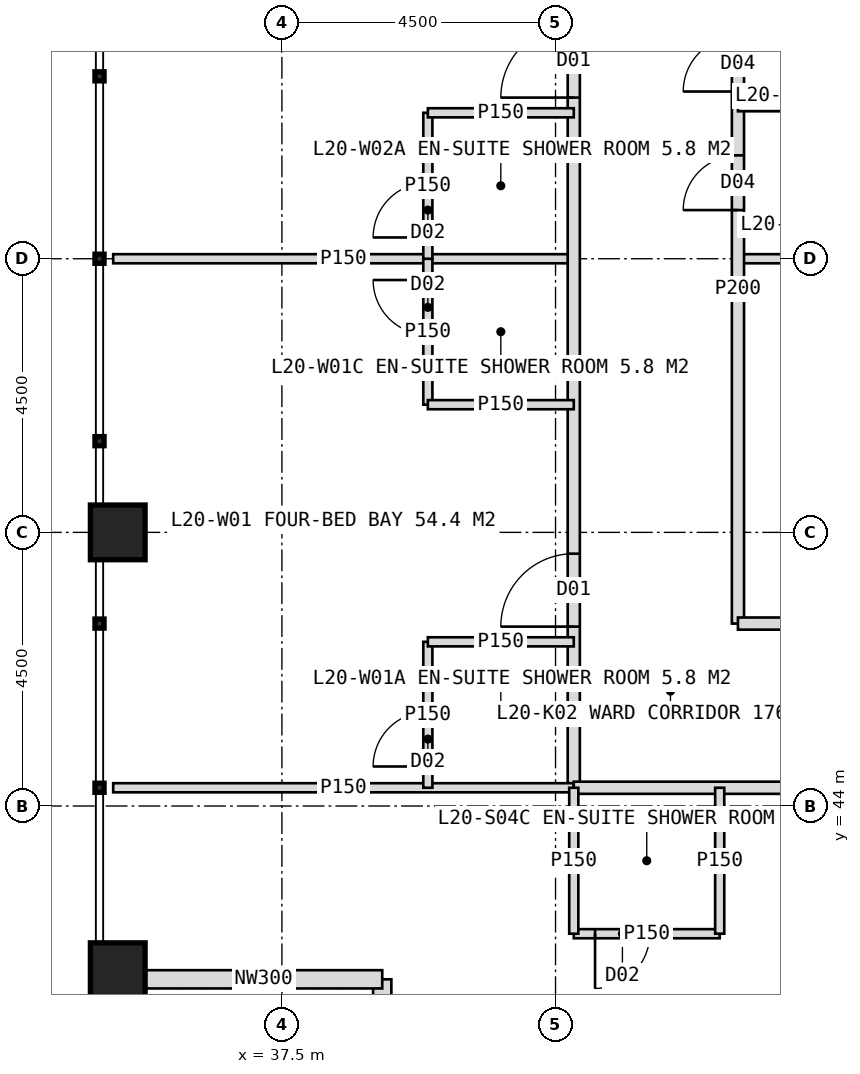
"""IFC4 building model, lengths in metres.
Left out: names, types, materials, properties, quantities, classifications, styles, units other than length and angle.
Written with IfcOpenShell. Run it as: python <this file> out.ifc"""

import sys

from ifc_helpers import new_model, si_unit, direction, frame, frame_2d, origin, origin_2d, place, context, subcontext, project, spatial, rectangle, hollow_rectangle, extrude, element, fill, save


model = new_model("IFC4")
c1 = context("Model", 3, precision=1e-05, world=origin(), true_north=direction((0.0, 1.0)))
c2 = subcontext(c1, "Body", "Model", "MODEL_VIEW")
j1 = project(units=[si_unit("LENGTHUNIT", "METRE"), si_unit("PLANEANGLEUNIT", "RADIAN")], contexts=[c1])
p1 = place(None, origin())
s1 = spatial("IfcSite", under=j1, at=p1, CompositionType="ELEMENT")
p2 = place(p1, origin())
s2 = spatial("IfcBuilding", under=s1, at=p2, CompositionType="ELEMENT")
p3 = place(p2, frame((0.0, 0.0, 87.0)))
s3 = spatial("IfcBuildingStorey", under=s2, at=p3, CompositionType="ELEMENT", Elevation=87.0)
for number, where, z_axis, x_axis in (
    (1, (34.8, 41.3, 0.0), (0.0, 0.0, 1.0), (1.0, 0.0, 0.0)),
    (2, (34.8, 48.5, 0.0), (0.0, 0.0, 1.0), (1.0, 0.0, 0.0)),
):
    element("IfcColumn", number, at=place(p3, frame(where, z_axis=z_axis, x_axis=x_axis)), inside=s3, PredefinedType="COLUMN", context=c2, shape_type="SweptSolid", body=[
        extrude(hollow_rectangle(XDim=0.9, YDim=0.9, WallThickness=0.08, at=origin_2d()), origin(), (0.0, 0.0, 1.0), 4.0),
    ])
for number, where, z_axis, x_axis in (
    (3, (39.15, 37.25, 0.0), (0.0, 0.0, 1.0), (0.0, 1.0, 0.0)),
    (4, (39.15, 41.15, 0.0), (0.0, 0.0, 1.0), (-1.0, 0.0, 0.0)),
):
    element("IfcWall", number, at=place(p3, frame(where, z_axis=z_axis, x_axis=x_axis)), inside=s3, PredefinedType="ELEMENTEDWALL", context=c2, shape_type="SweptSolid", body=[
        extrude(rectangle(XDim=3.9, YDim=0.3, at=frame_2d((1.95, 0.0))), origin(), (0.0, 0.0, 1.0), 2.95),
    ])
p4 = place(p3, frame((42.3, 53.0, 0.0), z_axis=(0.0, 0.0, 1.0), x_axis=(-1.0, 0.0, 0.0)))
e5 = element("IfcWall", 5, at=p4, inside=s3, PredefinedType="PARTITIONING", context=c2, shape_type="SweptSolid", body=[
    extrude(rectangle(XDim=7.575, YDim=0.15, at=frame_2d((3.788, 0.0))), origin(), (0.0, 0.0, 1.0), 3.75),
])
p5 = place(p3, frame((42.3, 44.3, 0.0), z_axis=(0.0, 0.0, 1.0), x_axis=(0.0, 1.0, 0.0)))
e6 = element("IfcWall", 6, at=p5, inside=s3, PredefinedType="PARTITIONING", context=c2, shape_type="SweptSolid", body=[
    extrude(rectangle(XDim=35.4, YDim=0.2, at=frame_2d((17.7, 0.0))), origin(), (0.0, 0.0, 1.0), 3.75),
])
p6 = place(p5, frame((2.65, 0.0, 0.0)))
e7 = element("IfcOpeningElement", 7, at=p6, cuts=e6, PredefinedType="OPENING", context=c2, shape_type="SweptSolid", body=[
    extrude(rectangle(XDim=1.2, YDim=2.2, at=frame_2d((0.6, 1.1))), frame((0.0, 0.11, 0.0), z_axis=(0.0, -1.0, 0.0), x_axis=(1.0, 0.0, 0.0)), (0.0, 0.0, 1.0), 0.22),
])
p7 = place(p5, frame((11.35, 0.0, 0.0)))
e8 = element("IfcOpeningElement", 8, at=p7, cuts=e6, PredefinedType="OPENING", context=c2, shape_type="SweptSolid", body=[
    extrude(rectangle(XDim=1.2, YDim=2.2, at=frame_2d((0.6, 1.1))), frame((0.0, 0.11, 0.0), z_axis=(0.0, -1.0, 0.0), x_axis=(1.0, 0.0, 0.0)), (0.0, 0.0, 1.0), 0.22),
])
p8 = place(p5, frame((20.35, 0.0, 0.0)))
e9 = element("IfcOpeningElement", 9, at=p8, cuts=e6, PredefinedType="OPENING", context=c2, shape_type="SweptSolid", body=[
    extrude(rectangle(XDim=1.2, YDim=2.2, at=frame_2d((0.6, 1.1))), frame((0.0, 0.11, 0.0), z_axis=(0.0, -1.0, 0.0), x_axis=(1.0, 0.0, 0.0)), (0.0, 0.0, 1.0), 0.22),
])
p9 = place(p5, frame((26.35, 0.0, 0.0)))
e10 = element("IfcOpeningElement", 10, at=p9, cuts=e6, PredefinedType="OPENING", context=c2, shape_type="SweptSolid", body=[
    extrude(rectangle(XDim=1.2, YDim=2.2, at=frame_2d((0.6, 1.1))), frame((0.0, 0.11, 0.0), z_axis=(0.0, -1.0, 0.0), x_axis=(1.0, 0.0, 0.0)), (0.0, 0.0, 1.0), 0.22),
])
p10 = place(p5, frame((30.85, 0.0, 0.0)))
e11 = element("IfcOpeningElement", 11, at=p10, cuts=e6, PredefinedType="OPENING", context=c2, shape_type="SweptSolid", body=[
    extrude(rectangle(XDim=1.2, YDim=2.2, at=frame_2d((0.6, 1.1))), frame((0.0, 0.11, 0.0), z_axis=(0.0, -1.0, 0.0), x_axis=(1.0, 0.0, 0.0)), (0.0, 0.0, 1.0), 0.22),
])
p11 = place(p3, frame((42.3, 44.3, 0.0), z_axis=(0.0, 0.0, 1.0), x_axis=(-1.0, 0.0, 0.0)))
e12 = element("IfcWall", 12, at=p11, inside=s3, PredefinedType="PARTITIONING", context=c2, shape_type="SweptSolid", body=[
    extrude(rectangle(XDim=7.575, YDim=0.15, at=frame_2d((3.788, 0.0))), origin(), (0.0, 0.0, 1.0), 3.75),
])
p12 = place(p3, frame((39.9, 44.3, 0.0), z_axis=(0.0, 0.0, 1.0), x_axis=(0.0, 1.0, 0.0)))
e13 = element("IfcWall", 13, at=p12, inside=s3, PredefinedType="PARTITIONING", context=c2, shape_type="SweptSolid", body=[
    extrude(rectangle(XDim=2.4, YDim=0.15, at=frame_2d((1.2, 0.0))), origin(), (0.0, 0.0, 1.0), 3.75),
])
p13 = place(p12, frame((0.35, 0.0, 0.0)))
e14 = element("IfcOpeningElement", 14, at=p13, cuts=e13, PredefinedType="OPENING", context=c2, shape_type="SweptSolid", body=[
    extrude(rectangle(XDim=0.9, YDim=2.1, at=frame_2d((0.45, 1.05))), frame((0.0, 0.085, 0.0), z_axis=(0.0, -1.0, 0.0), x_axis=(1.0, 0.0, 0.0)), (0.0, 0.0, 1.0), 0.17),
])
p14 = place(p3, frame((42.3, 46.7, 0.0), z_axis=(0.0, 0.0, 1.0), x_axis=(-1.0, 0.0, 0.0)))
e15 = element("IfcWall", 15, at=p14, inside=s3, PredefinedType="PARTITIONING", context=c2, shape_type="SweptSolid", body=[
    extrude(rectangle(XDim=2.4, YDim=0.15, at=frame_2d((1.2, 0.0))), origin(), (0.0, 0.0, 1.0), 3.75),
])
p15 = place(p3, frame((39.9, 50.6, 0.0), z_axis=(0.0, 0.0, 1.0), x_axis=(0.0, 1.0, 0.0)))
e16 = element("IfcWall", 16, at=p15, inside=s3, PredefinedType="PARTITIONING", context=c2, shape_type="SweptSolid", body=[
    extrude(rectangle(XDim=2.4, YDim=0.15, at=frame_2d((1.2, 0.0))), origin(), (0.0, 0.0, 1.0), 3.75),
])
p16 = place(p15, frame((1.15, 0.0, 0.0)))
e17 = element("IfcOpeningElement", 17, at=p16, cuts=e16, PredefinedType="OPENING", context=c2, shape_type="SweptSolid", body=[
    extrude(rectangle(XDim=0.9, YDim=2.1, at=frame_2d((0.45, 1.05))), frame((0.0, 0.085, 0.0), z_axis=(0.0, -1.0, 0.0), x_axis=(1.0, 0.0, 0.0)), (0.0, 0.0, 1.0), 0.17),
])
p17 = place(p3, frame((42.3, 50.6, 0.0), z_axis=(0.0, 0.0, 1.0), x_axis=(-1.0, 0.0, 0.0)))
e18 = element("IfcWall", 18, at=p17, inside=s3, PredefinedType="PARTITIONING", context=c2, shape_type="SweptSolid", body=[
    extrude(rectangle(XDim=2.4, YDim=0.15, at=frame_2d((1.2, 0.0))), origin(), (0.0, 0.0, 1.0), 3.75),
])
p18 = place(p3, frame((39.9, 53.0, 0.0), z_axis=(0.0, 0.0, 1.0), x_axis=(0.0, 1.0, 0.0)))
e19 = element("IfcWall", 19, at=p18, inside=s3, PredefinedType="PARTITIONING", context=c2, shape_type="SweptSolid", body=[
    extrude(rectangle(XDim=2.4, YDim=0.15, at=frame_2d((1.2, 0.0))), origin(), (0.0, 0.0, 1.0), 3.75),
])
p19 = place(p18, frame((0.35, 0.0, 0.0)))
e20 = element("IfcOpeningElement", 20, at=p19, cuts=e19, PredefinedType="OPENING", context=c2, shape_type="SweptSolid", body=[
    extrude(rectangle(XDim=0.9, YDim=2.1, at=frame_2d((0.45, 1.05))), frame((0.0, 0.085, 0.0), z_axis=(0.0, -1.0, 0.0), x_axis=(1.0, 0.0, 0.0)), (0.0, 0.0, 1.0), 0.17),
])
p20 = place(p3, frame((42.3, 55.4, 0.0), z_axis=(0.0, 0.0, 1.0), x_axis=(-1.0, 0.0, 0.0)))
e21 = element("IfcWall", 21, at=p20, inside=s3, PredefinedType="PARTITIONING", context=c2, shape_type="SweptSolid", body=[
    extrude(rectangle(XDim=2.4, YDim=0.15, at=frame_2d((1.2, 0.0))), origin(), (0.0, 0.0, 1.0), 3.75),
])
p21 = place(p3, frame((51.0, 53.0, 0.0), z_axis=(0.0, 0.0, 1.0), x_axis=(-1.0, 0.0, 0.0)))
e22 = element("IfcWall", 22, at=p21, inside=s3, PredefinedType="PARTITIONING", context=c2, shape_type="SweptSolid", body=[
    extrude(rectangle(XDim=6.0, YDim=0.15, at=frame_2d((3.0, 0.0))), origin(), (0.0, 0.0, 1.0), 3.75),
])
p22 = place(p3, frame((45.0, 47.0, 0.0), z_axis=(0.0, 0.0, 1.0), x_axis=(0.0, 1.0, 0.0)))
e23 = element("IfcWall", 23, at=p22, inside=s3, PredefinedType="PARTITIONING", context=c2, shape_type="SweptSolid", body=[
    extrude(rectangle(XDim=11.0, YDim=0.2, at=frame_2d((5.5, 0.0))), origin(), (0.0, 0.0, 1.0), 3.75),
])
p23 = place(p22, frame((6.8, 0.0, 0.0)))
e24 = element("IfcOpeningElement", 24, at=p23, cuts=e23, PredefinedType="OPENING", context=c2, shape_type="SweptSolid", body=[
    extrude(rectangle(XDim=0.9, YDim=2.1, at=frame_2d((0.45, 1.05))), frame((0.0, 0.11, 0.0), z_axis=(0.0, -1.0, 0.0), x_axis=(1.0, 0.0, 0.0)), (0.0, 0.0, 1.0), 0.22),
])
p24 = place(p22, frame((8.75, 0.0, 0.0)))
e25 = element("IfcOpeningElement", 25, at=p24, cuts=e23, PredefinedType="OPENING", context=c2, shape_type="SweptSolid", body=[
    extrude(rectangle(XDim=0.9, YDim=2.1, at=frame_2d((0.45, 1.05))), frame((0.0, 0.11, 0.0), z_axis=(0.0, -1.0, 0.0), x_axis=(1.0, 0.0, 0.0)), (0.0, 0.0, 1.0), 0.22),
])
p25 = place(p3, frame((51.0, 55.5, 0.0), z_axis=(0.0, 0.0, 1.0), x_axis=(-1.0, 0.0, 0.0)))
e26 = element("IfcWall", 26, at=p25, inside=s3, PredefinedType="PARTITIONING", context=c2, shape_type="SweptSolid", body=[
    extrude(rectangle(XDim=6.0, YDim=0.15, at=frame_2d((3.0, 0.0))), origin(), (0.0, 0.0, 1.0), 3.75),
])
p26 = place(p3, frame((77.7, 44.3, 0.0), z_axis=(0.0, 0.0, 1.0), x_axis=(-1.0, 0.0, 0.0)))
e27 = element("IfcWall", 27, at=p26, inside=s3, PredefinedType="PARTITIONING", context=c2, shape_type="SweptSolid", body=[
    extrude(rectangle(XDim=35.4, YDim=0.2, at=frame_2d((17.7, 0.0))), origin(), (0.0, 0.0, 1.0), 3.75),
])
p27 = place(p26, frame((2.65, 0.0, 0.0)))
e28 = element("IfcOpeningElement", 28, at=p27, cuts=e27, PredefinedType="OPENING", context=c2, shape_type="SweptSolid", body=[
    extrude(rectangle(XDim=1.2, YDim=2.2, at=frame_2d((0.6, 1.1))), frame((0.0, 0.11, 0.0), z_axis=(0.0, -1.0, 0.0), x_axis=(1.0, 0.0, 0.0)), (0.0, 0.0, 1.0), 0.22),
])
p28 = place(p26, frame((11.35, 0.0, 0.0)))
e29 = element("IfcOpeningElement", 29, at=p28, cuts=e27, PredefinedType="OPENING", context=c2, shape_type="SweptSolid", body=[
    extrude(rectangle(XDim=1.2, YDim=2.2, at=frame_2d((0.6, 1.1))), frame((0.0, 0.11, 0.0), z_axis=(0.0, -1.0, 0.0), x_axis=(1.0, 0.0, 0.0)), (0.0, 0.0, 1.0), 0.22),
])
p29 = place(p26, frame((20.35, 0.0, 0.0)))
e30 = element("IfcOpeningElement", 30, at=p29, cuts=e27, PredefinedType="OPENING", context=c2, shape_type="SweptSolid", body=[
    extrude(rectangle(XDim=1.2, YDim=2.2, at=frame_2d((0.6, 1.1))), frame((0.0, 0.11, 0.0), z_axis=(0.0, -1.0, 0.0), x_axis=(1.0, 0.0, 0.0)), (0.0, 0.0, 1.0), 0.22),
])
p30 = place(p26, frame((29.35, 0.0, 0.0)))
e31 = element("IfcOpeningElement", 31, at=p30, cuts=e27, PredefinedType="OPENING", context=c2, shape_type="SweptSolid", body=[
    extrude(rectangle(XDim=1.2, YDim=2.2, at=frame_2d((0.6, 1.1))), frame((0.0, 0.11, 0.0), z_axis=(0.0, -1.0, 0.0), x_axis=(1.0, 0.0, 0.0)), (0.0, 0.0, 1.0), 0.22),
])
p31 = place(p3, frame((44.7, 41.9, 0.0), z_axis=(0.0, 0.0, 1.0), x_axis=(-1.0, 0.0, 0.0)))
e32 = element("IfcWall", 32, at=p31, inside=s3, PredefinedType="PARTITIONING", context=c2, shape_type="SweptSolid", body=[
    extrude(rectangle(XDim=2.4, YDim=0.15, at=frame_2d((1.2, 0.0))), origin(), (0.0, 0.0, 1.0), 3.75),
])
p32 = place(p31, frame((1.15, 0.0, 0.0)))
e33 = element("IfcOpeningElement", 33, at=p32, cuts=e32, PredefinedType="OPENING", context=c2, shape_type="SweptSolid", body=[
    extrude(rectangle(XDim=0.9, YDim=2.1, at=frame_2d((0.45, 1.05))), frame((0.0, 0.085, 0.0), z_axis=(0.0, -1.0, 0.0), x_axis=(1.0, 0.0, 0.0)), (0.0, 0.0, 1.0), 0.17),
])
for number, where, z_axis, x_axis in (
    (34, (44.7, 44.3, 0.0), (0.0, 0.0, 1.0), (0.0, -1.0, 0.0)),
    (35, (42.3, 44.3, 0.0), (0.0, 0.0, 1.0), (0.0, -1.0, 0.0)),
):
    element("IfcWall", number, at=place(p3, frame(where, z_axis=z_axis, x_axis=x_axis)), inside=s3, PredefinedType="PARTITIONING", context=c2, shape_type="SweptSolid", body=[
        extrude(rectangle(XDim=2.4, YDim=0.15, at=frame_2d((1.2, 0.0))), origin(), (0.0, 0.0, 1.0), 3.75),
    ])
p33 = place(p3, frame((57.75, 47.0, 0.0), z_axis=(0.0, 0.0, 1.0), x_axis=(-1.0, 0.0, 0.0)))
e36 = element("IfcWall", 36, at=p33, inside=s3, PredefinedType="PARTITIONING", context=c2, shape_type="SweptSolid", body=[
    extrude(rectangle(XDim=12.75, YDim=0.2, at=frame_2d((6.375, 0.0))), origin(), (0.0, 0.0, 1.0), 3.75),
])
p34 = place(p33, frame((3.55, 0.0, 0.0)))
e37 = element("IfcOpeningElement", 37, at=p34, cuts=e36, PredefinedType="OPENING", context=c2, shape_type="SweptSolid", body=[
    extrude(rectangle(XDim=1.0, YDim=2.1, at=frame_2d((0.5, 1.05))), frame((0.0, 0.11, 0.0), z_axis=(0.0, -1.0, 0.0), x_axis=(1.0, 0.0, 0.0)), (0.0, 0.0, 1.0), 0.22),
])
p35 = place(p33, frame((8.5, 0.0, 0.0)))
e38 = element("IfcOpeningElement", 38, at=p35, cuts=e36, PredefinedType="OPENING", context=c2, shape_type="SweptSolid", body=[
    extrude(rectangle(XDim=1.0, YDim=2.1, at=frame_2d((0.5, 1.05))), frame((0.0, 0.11, 0.0), z_axis=(0.0, -1.0, 0.0), x_axis=(1.0, 0.0, 0.0)), (0.0, 0.0, 1.0), 0.22),
])
p36 = place(p6, origin())
e39 = element("IfcDoor", 39, at=p36, inside=s3, OperationType="SINGLE_SWING_LEFT", PredefinedType="DOOR", context=c2, shape_type="SweptSolid", body=[
    extrude(rectangle(XDim=1.2, YDim=2.2, at=frame_2d((0.6, 1.1))), frame((0.0, 0.025, 0.0), z_axis=(0.0, -1.0, 0.0), x_axis=(1.0, 0.0, 0.0)), (0.0, 0.0, 1.0), 0.05),
])
fill(e7, e39)
p37 = place(p13, origin())
e40 = element("IfcDoor", 40, at=p37, inside=s3, OperationType="SINGLE_SWING_LEFT", PredefinedType="DOOR", context=c2, shape_type="SweptSolid", body=[
    extrude(rectangle(XDim=0.9, YDim=2.1, at=frame_2d((0.45, 1.05))), frame((0.0, 0.025, 0.0), z_axis=(0.0, -1.0, 0.0), x_axis=(1.0, 0.0, 0.0)), (0.0, 0.0, 1.0), 0.05),
])
fill(e14, e40)
p38 = place(p16, origin())
e41 = element("IfcDoor", 41, at=p38, inside=s3, OperationType="SINGLE_SWING_RIGHT", PredefinedType="DOOR", context=c2, shape_type="SweptSolid", body=[
    extrude(rectangle(XDim=0.9, YDim=2.1, at=frame_2d((0.45, 1.05))), frame((0.0, 0.025, 0.0), z_axis=(0.0, -1.0, 0.0), x_axis=(1.0, 0.0, 0.0)), (0.0, 0.0, 1.0), 0.05),
])
fill(e17, e41)
p39 = place(p7, origin())
e42 = element("IfcDoor", 42, at=p39, inside=s3, OperationType="SINGLE_SWING_LEFT", PredefinedType="DOOR", context=c2, shape_type="SweptSolid", body=[
    extrude(rectangle(XDim=1.2, YDim=2.2, at=frame_2d((0.6, 1.1))), frame((0.0, 0.025, 0.0), z_axis=(0.0, -1.0, 0.0), x_axis=(1.0, 0.0, 0.0)), (0.0, 0.0, 1.0), 0.05),
])
fill(e8, e42)
p40 = place(p19, origin())
e43 = element("IfcDoor", 43, at=p40, inside=s3, OperationType="SINGLE_SWING_LEFT", PredefinedType="DOOR", context=c2, shape_type="SweptSolid", body=[
    extrude(rectangle(XDim=0.9, YDim=2.1, at=frame_2d((0.45, 1.05))), frame((0.0, 0.025, 0.0), z_axis=(0.0, -1.0, 0.0), x_axis=(1.0, 0.0, 0.0)), (0.0, 0.0, 1.0), 0.05),
])
fill(e20, e43)
p41 = place(p23, origin())
e44 = element("IfcDoor", 44, at=p41, inside=s3, OperationType="SINGLE_SWING_LEFT", PredefinedType="DOOR", context=c2, shape_type="SweptSolid", body=[
    extrude(rectangle(XDim=0.9, YDim=2.1, at=frame_2d((0.45, 1.05))), frame((0.0, 0.025, 0.0), z_axis=(0.0, -1.0, 0.0), x_axis=(1.0, 0.0, 0.0)), (0.0, 0.0, 1.0), 0.05),
])
fill(e24, e44)
p42 = place(p24, origin())
e45 = element("IfcDoor", 45, at=p42, inside=s3, OperationType="SINGLE_SWING_LEFT", PredefinedType="DOOR", context=c2, shape_type="SweptSolid", body=[
    extrude(rectangle(XDim=0.9, YDim=2.1, at=frame_2d((0.45, 1.05))), frame((0.0, 0.025, 0.0), z_axis=(0.0, -1.0, 0.0), x_axis=(1.0, 0.0, 0.0)), (0.0, 0.0, 1.0), 0.05),
])
fill(e25, e45)
p43 = place(p32, origin())
e46 = element("IfcDoor", 46, at=p43, inside=s3, OperationType="SINGLE_SWING_RIGHT", PredefinedType="DOOR", context=c2, shape_type="SweptSolid", body=[
    extrude(rectangle(XDim=0.9, YDim=2.1, at=frame_2d((0.45, 1.05))), frame((0.0, 0.025, 0.0), z_axis=(0.0, -1.0, 0.0), x_axis=(1.0, 0.0, 0.0)), (0.0, 0.0, 1.0), 0.05),
])
fill(e33, e46)
save(model, sys.argv[1])
